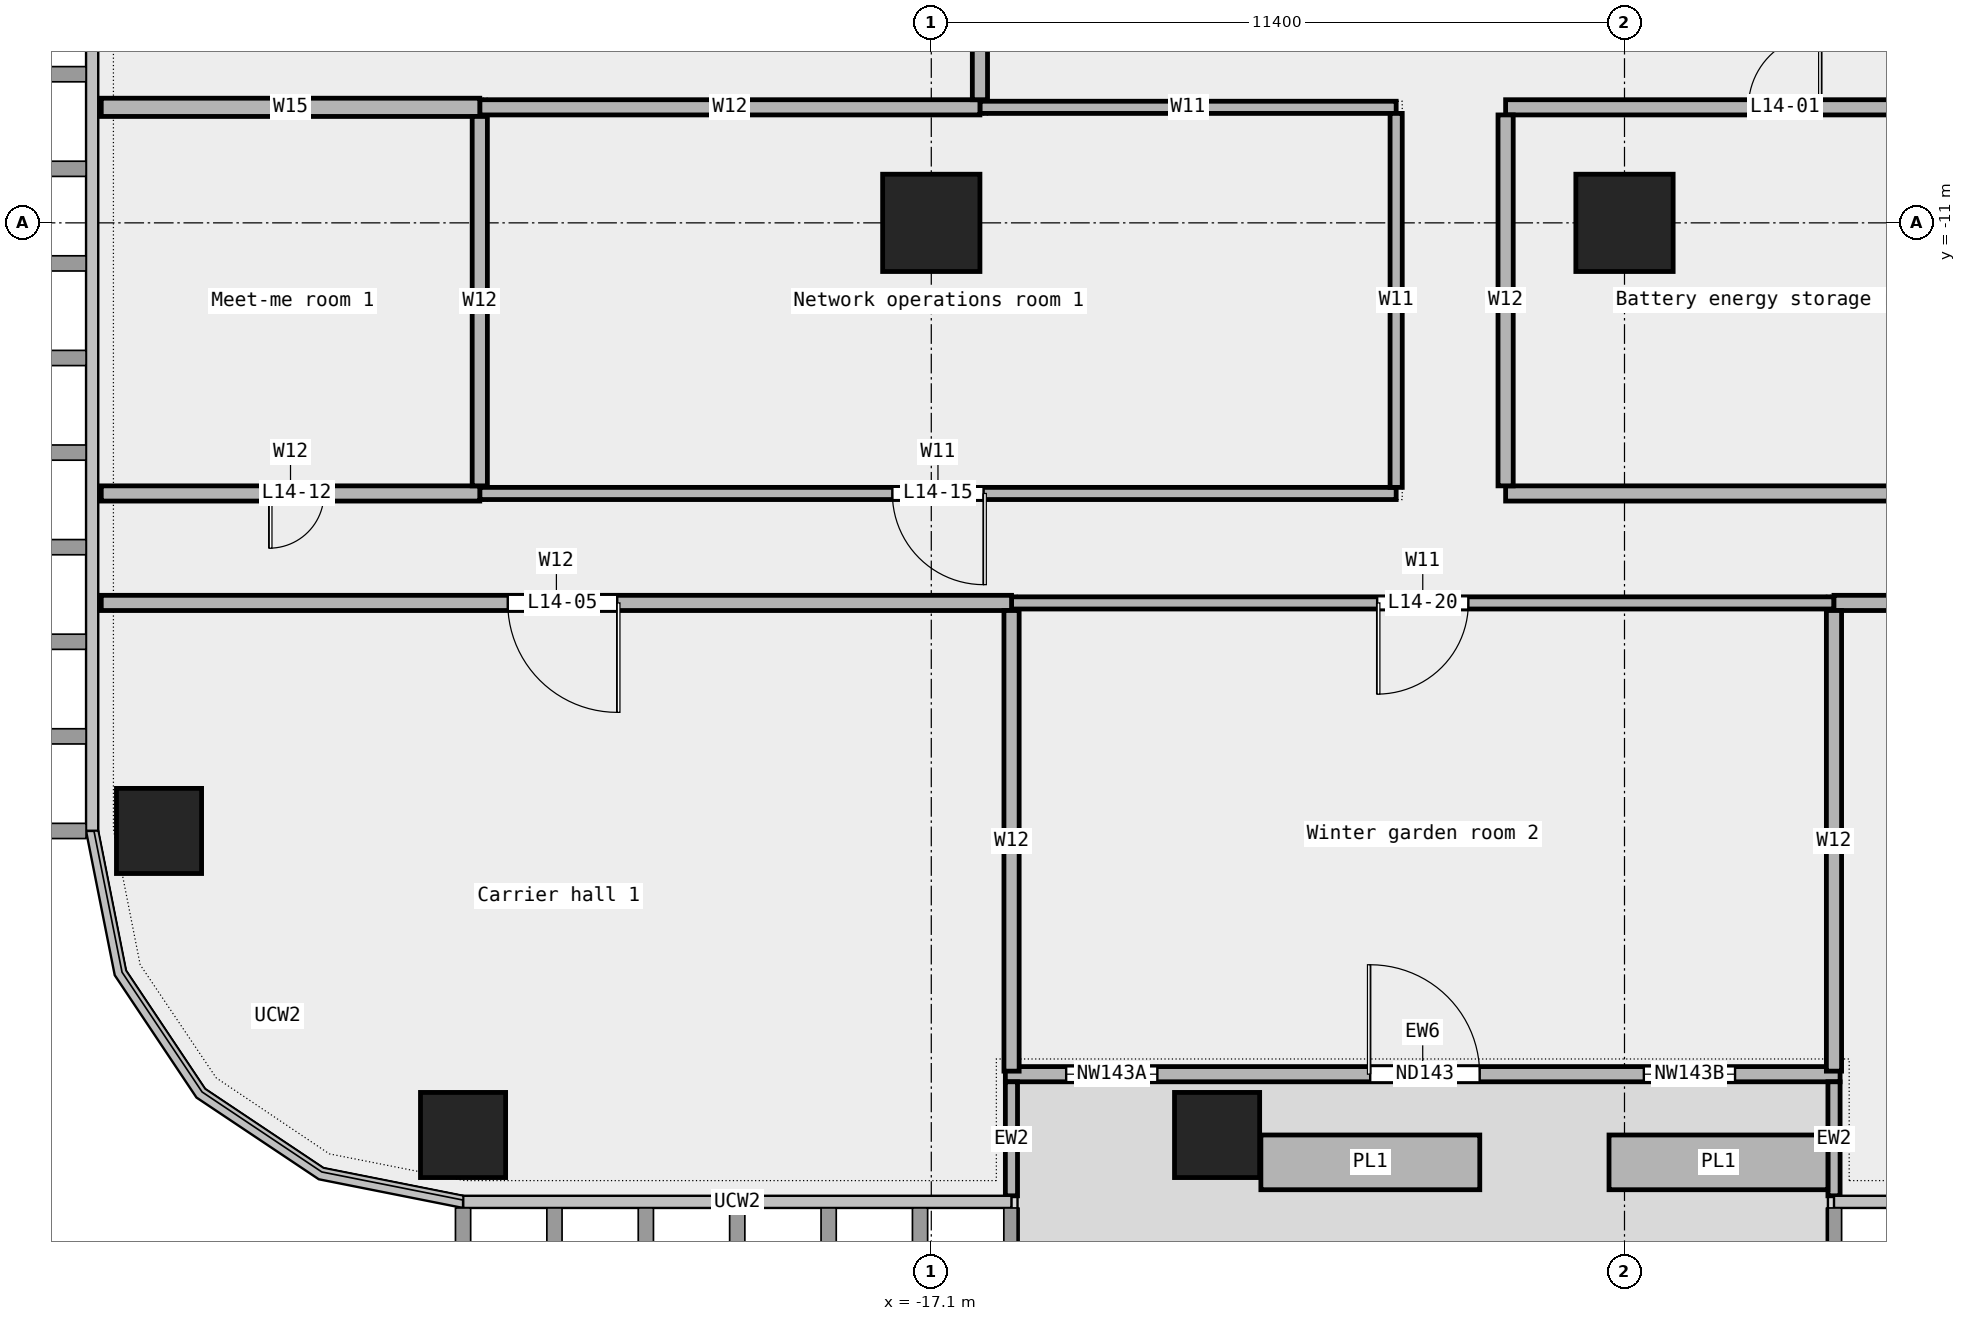
"""IFC4 building model, lengths in metres.
Left out: names, types, materials, properties, quantities, classifications, styles, units other than length and angle.
Written with IfcOpenShell. Run it as: python <this file> out.ifc"""

import sys

from ifc_helpers import new_model, si_unit, direction, frame, frame_2d, origin, origin_2d, place, context, subcontext, project, spatial, rectangle, extrude, element, fill, save


model = new_model("IFC4")
c1 = context("Model", 3, precision=1e-05, world=origin(), true_north=direction((0.0, 1.0)))
c2 = subcontext(c1, "Body", "Model", "MODEL_VIEW")
j1 = project(units=[si_unit("LENGTHUNIT", "METRE"), si_unit("PLANEANGLEUNIT", "RADIAN")], contexts=[c1])
p1 = place(None, origin())
s1 = spatial("IfcSite", under=j1, at=p1, CompositionType="ELEMENT")
p2 = place(p1, origin())
s2 = spatial("IfcBuilding", under=s1, at=p2, CompositionType="ELEMENT")
p3 = place(p2, frame((0.0, 0.0, 74.2)))
s3 = spatial("IfcBuildingStorey", under=s2, at=p3, CompositionType="ELEMENT", Elevation=74.2)
for number, where, z_axis, x_axis in (
    (1, (-24.8, -26.0, 0.0), (0.0, 0.0, 1.0), (1.0, 0.0, 0.0)),
    (2, (-12.4, -26.0, 0.0), (0.0, 0.0, 1.0), (1.0, 0.0, 0.0)),
    (3, (-29.8, -21.0, 0.0), (0.0, 0.0, 1.0), (1.0, 0.0, 0.0)),
):
    element("IfcColumn", number, at=place(p3, frame(where, z_axis=z_axis, x_axis=x_axis)), inside=s3, PredefinedType="COLUMN", context=c2, shape_type="SweptSolid", body=[
        extrude(rectangle(XDim=1.4, YDim=1.4, at=origin_2d()), origin(), (0.0, 0.0, 1.0), 4.35),
    ])
for number, where, z_axis, x_axis in (
    (4, (-17.1, -11.0, 0.0), (0.0, 0.0, 1.0), (1.0, 0.0, 0.0)),
    (5, (-5.7, -11.0, 0.0), (0.0, 0.0, 1.0), (1.0, 0.0, 0.0)),
):
    element("IfcColumn", number, at=place(p3, frame(where, z_axis=z_axis, x_axis=x_axis)), inside=s3, PredefinedType="COLUMN", context=c2, shape_type="SweptSolid", body=[
        extrude(rectangle(XDim=1.6, YDim=1.6, at=origin_2d()), origin(), (0.0, 0.0, 1.0), 4.35),
    ])
p4 = place(p3, frame((-15.882, -25.0, 0.0), z_axis=(0.0, 0.0, 1.0), x_axis=(1.0, 0.0, 0.0)))
e6 = element("IfcWall", 6, at=p4, inside=s3, PredefinedType="STANDARD", context=c2, shape_type="SweptSolid", body=[
    extrude(rectangle(XDim=13.727, YDim=0.25, at=frame_2d((6.864, 0.0))), origin(), (0.0, 0.0, 1.0), 4.35),
])
p5 = place(p4, frame((1.0, 0.0, 0.45)))
e7 = element("IfcOpeningElement", 7, at=p5, cuts=e6, PredefinedType="OPENING", context=c2, shape_type="SweptSolid", body=[
    extrude(rectangle(XDim=1.5, YDim=3.0, at=frame_2d((0.75, 1.5))), frame((0.0, 0.137, 0.0), z_axis=(0.0, -1.0, 0.0), x_axis=(1.0, 0.0, 0.0)), (0.0, 0.0, 1.0), 0.274),
])
p6 = place(p4, frame((6.0, 0.0, 0.0)))
e8 = element("IfcOpeningElement", 8, at=p6, cuts=e6, PredefinedType="OPENING", context=c2, shape_type="SweptSolid", body=[
    extrude(rectangle(XDim=1.8, YDim=2.4, at=frame_2d((0.9, 1.2))), frame((0.0, 0.137, 0.0), z_axis=(0.0, -1.0, 0.0), x_axis=(1.0, 0.0, 0.0)), (0.0, 0.0, 1.0), 0.274),
])
p7 = place(p4, frame((10.5, 0.0, 0.45)))
e9 = element("IfcOpeningElement", 9, at=p7, cuts=e6, PredefinedType="OPENING", context=c2, shape_type="SweptSolid", body=[
    extrude(rectangle(XDim=1.5, YDim=3.0, at=frame_2d((0.75, 1.5))), frame((0.0, 0.137, 0.0), z_axis=(0.0, -1.0, 0.0), x_axis=(1.0, 0.0, 0.0)), (0.0, 0.0, 1.0), 0.274),
])
for number, where, z_axis, x_axis in (
    (10, (-15.782, -27.0, 0.0), (0.0, 0.0, 1.0), (0.0, 1.0, 0.0)),
    (11, (-2.255, -27.0, 0.0), (0.0, 0.0, 1.0), (0.0, 1.0, 0.0)),
):
    element("IfcWall", number, at=place(p3, frame(where, z_axis=z_axis, x_axis=x_axis)), inside=s3, PredefinedType="STANDARD", context=c2, shape_type="SweptSolid", body=[
        extrude(rectangle(XDim=1.875, YDim=0.2, at=frame_2d((0.938, 0.0))), origin(), (0.0, 0.0, 1.0), 4.35),
    ])
for number, where, z_axis, x_axis in (
    (12, (-11.68, -26.45, 0.0), (0.0, 0.0, 1.0), (1.0, 0.0, 0.0)),
    (13, (-5.955, -26.45, 0.0), (0.0, 0.0, 1.0), (1.0, 0.0, 0.0)),
):
    element("IfcWall", number, at=place(p3, frame(where, z_axis=z_axis, x_axis=x_axis)), inside=s3, PredefinedType="STANDARD", context=c2, shape_type="SweptSolid", body=[
        extrude(rectangle(XDim=3.6, YDim=0.9, at=frame_2d((1.8, 0.0))), origin(), (0.0, 0.0, 1.0), 0.7),
    ])
p8 = place(p3, frame((-15.78, -17.25, 0.0), z_axis=(0.0, 0.0, 1.0), x_axis=(1.0, 0.0, 0.0)))
e14 = element("IfcWall", 14, at=p8, inside=s3, PredefinedType="PARTITIONING", context=c2, shape_type="SweptSolid", body=[
    extrude(rectangle(XDim=13.525, YDim=0.2, at=frame_2d((6.763, 0.0))), origin(), (0.0, 0.0, 1.0), 4.35),
])
p9 = place(p8, frame((6.012, 0.0, 0.0)))
e15 = element("IfcOpeningElement", 15, at=p9, cuts=e14, PredefinedType="OPENING", context=c2, shape_type="SweptSolid", body=[
    extrude(rectangle(XDim=1.5, YDim=2.1, at=frame_2d((0.75, 1.05))), frame((0.0, 0.112, 0.0), z_axis=(0.0, -1.0, 0.0), x_axis=(1.0, 0.0, 0.0)), (0.0, 0.0, 1.0), 0.224),
])
p10 = place(p3, frame((-30.75, -17.25, 0.0), z_axis=(0.0, 0.0, 1.0), x_axis=(1.0, 0.0, 0.0)))
e16 = element("IfcWall", 16, at=p10, inside=s3, PredefinedType="PARTITIONING", context=c2, shape_type="SweptSolid", body=[
    extrude(rectangle(XDim=14.97, YDim=0.25, at=frame_2d((7.485, 0.0))), origin(), (0.0, 0.0, 1.0), 4.35),
])
p11 = place(p10, frame((6.685, 0.0, 0.0)))
e17 = element("IfcOpeningElement", 17, at=p11, cuts=e16, PredefinedType="OPENING", context=c2, shape_type="SweptSolid", body=[
    extrude(rectangle(XDim=1.8, YDim=2.1, at=frame_2d((0.9, 1.05))), frame((0.0, 0.137, 0.0), z_axis=(0.0, -1.0, 0.0), x_axis=(1.0, 0.0, 0.0)), (0.0, 0.0, 1.0), 0.274),
])
p12 = place(p3, frame((-2.255, -17.25, 0.0), z_axis=(0.0, 0.0, 1.0), x_axis=(1.0, 0.0, 0.0)))
e18 = element("IfcWall", 18, at=p12, inside=s3, PredefinedType="PARTITIONING", context=c2, shape_type="SweptSolid", body=[
    extrude(rectangle(XDim=33.005, YDim=0.25, at=frame_2d((16.502, 0.0))), origin(), (0.0, 0.0, 1.0), 4.35),
])
p13 = place(p12, frame((7.025, 0.0, 0.0)))
e19 = element("IfcOpeningElement", 19, at=p13, cuts=e18, PredefinedType="OPENING", context=c2, shape_type="SweptSolid", body=[
    extrude(rectangle(XDim=1.8, YDim=2.1, at=frame_2d((0.9, 1.05))), frame((0.0, 0.137, 0.0), z_axis=(0.0, -1.0, 0.0), x_axis=(1.0, 0.0, 0.0)), (0.0, 0.0, 1.0), 0.274),
])
p14 = place(p12, frame((23.427, 0.0, 0.0)))
e20 = element("IfcOpeningElement", 20, at=p14, cuts=e18, PredefinedType="OPENING", context=c2, shape_type="SweptSolid", body=[
    extrude(rectangle(XDim=1.8, YDim=2.1, at=frame_2d((0.9, 1.05))), frame((0.0, 0.137, 0.0), z_axis=(0.0, -1.0, 0.0), x_axis=(1.0, 0.0, 0.0)), (0.0, 0.0, 1.0), 0.274),
])
p15 = place(p3, frame((-24.525, -15.45, 0.0), z_axis=(0.0, 0.0, 1.0), x_axis=(1.0, 0.0, 0.0)))
e21 = element("IfcWall", 21, at=p15, inside=s3, PredefinedType="PARTITIONING", context=c2, shape_type="SweptSolid", body=[
    extrude(rectangle(XDim=15.07, YDim=0.2, at=frame_2d((7.535, 0.0))), origin(), (0.0, 0.0, 1.0), 4.35),
])
p16 = place(p15, frame((6.785, 0.0, 0.0)))
e22 = element("IfcOpeningElement", 22, at=p16, cuts=e21, PredefinedType="OPENING", context=c2, shape_type="SweptSolid", body=[
    extrude(rectangle(XDim=1.5, YDim=2.1, at=frame_2d((0.75, 1.05))), frame((0.0, 0.112, 0.0), z_axis=(0.0, -1.0, 0.0), x_axis=(1.0, 0.0, 0.0)), (0.0, 0.0, 1.0), 0.224),
])
p17 = place(p3, frame((-30.75, -15.45, 0.0), z_axis=(0.0, 0.0, 1.0), x_axis=(1.0, 0.0, 0.0)))
e23 = element("IfcWall", 23, at=p17, inside=s3, PredefinedType="PARTITIONING", context=c2, shape_type="SweptSolid", body=[
    extrude(rectangle(XDim=6.225, YDim=0.25, at=frame_2d((3.113, 0.0))), origin(), (0.0, 0.0, 1.0), 4.35),
])
p18 = place(p17, frame((2.762, 0.0, 0.0)))
e24 = element("IfcOpeningElement", 24, at=p18, cuts=e23, PredefinedType="OPENING", context=c2, shape_type="SweptSolid", body=[
    extrude(rectangle(XDim=0.9, YDim=2.1, at=frame_2d((0.45, 1.05))), frame((0.0, 0.137, 0.0), z_axis=(0.0, -1.0, 0.0), x_axis=(1.0, 0.0, 0.0)), (0.0, 0.0, 1.0), 0.274),
])
p19 = place(p3, frame((-7.655, -15.45, 0.0), z_axis=(0.0, 0.0, 1.0), x_axis=(1.0, 0.0, 0.0)))
e25 = element("IfcWall", 25, at=p19, inside=s3, PredefinedType="PARTITIONING", context=c2, shape_type="SweptSolid", body=[
    extrude(rectangle(XDim=18.365, YDim=0.25, at=frame_2d((9.183, 0.0))), origin(), (0.0, 0.0, 1.0), 4.35),
])
p20 = place(p3, frame((-16.3, -9.1, 0.0), z_axis=(0.0, 0.0, 1.0), x_axis=(1.0, 0.0, 0.0)))
e26 = element("IfcWall", 26, at=p20, inside=s3, PredefinedType="PARTITIONING", context=c2, shape_type="SweptSolid", body=[
    extrude(rectangle(XDim=6.845, YDim=0.2, at=frame_2d((3.422, 0.0))), origin(), (0.0, 0.0, 1.0), 4.35),
])
p21 = place(p3, frame((-24.525, -9.1, 0.0), z_axis=(0.0, 0.0, 1.0), x_axis=(1.0, 0.0, 0.0)))
e27 = element("IfcWall", 27, at=p21, inside=s3, PredefinedType="PARTITIONING", context=c2, shape_type="SweptSolid", body=[
    extrude(rectangle(XDim=8.225, YDim=0.25, at=frame_2d((4.112, 0.0))), origin(), (0.0, 0.0, 1.0), 4.35),
])
p22 = place(p3, frame((-7.655, -9.1, 0.0), z_axis=(0.0, 0.0, 1.0), x_axis=(1.0, 0.0, 0.0)))
e28 = element("IfcWall", 28, at=p22, inside=s3, PredefinedType="PARTITIONING", context=c2, shape_type="SweptSolid", body=[
    extrude(rectangle(XDim=18.365, YDim=0.25, at=frame_2d((9.183, 0.0))), origin(), (0.0, 0.0, 1.0), 4.35),
])
p23 = place(p22, frame((3.992, 0.0, 0.0)))
e29 = element("IfcOpeningElement", 29, at=p23, cuts=e28, PredefinedType="OPENING", context=c2, shape_type="SweptSolid", body=[
    extrude(rectangle(XDim=1.2, YDim=2.1, at=frame_2d((0.6, 1.05))), frame((0.0, 0.137, 0.0), z_axis=(0.0, -1.0, 0.0), x_axis=(1.0, 0.0, 0.0)), (0.0, 0.0, 1.0), 0.274),
])
p24 = place(p22, frame((14.375, 0.0, 0.0)))
e30 = element("IfcOpeningElement", 30, at=p24, cuts=e28, PredefinedType="OPENING", context=c2, shape_type="SweptSolid", body=[
    extrude(rectangle(XDim=1.2, YDim=2.1, at=frame_2d((0.6, 1.05))), frame((0.0, 0.137, 0.0), z_axis=(0.0, -1.0, 0.0), x_axis=(1.0, 0.0, 0.0)), (0.0, 0.0, 1.0), 0.274),
])
p25 = place(p3, frame((-30.75, -9.1, 0.0), z_axis=(0.0, 0.0, 1.0), x_axis=(1.0, 0.0, 0.0)))
e31 = element("IfcWall", 31, at=p25, inside=s3, PredefinedType="PARTITIONING", context=c2, shape_type="SweptSolid", body=[
    extrude(rectangle(XDim=6.225, YDim=0.3, at=frame_2d((3.113, 0.0))), origin(), (0.0, 0.0, 1.0), 4.35),
])
p26 = place(p3, frame((-24.525, -15.325, 0.0), z_axis=(0.0, 0.0, 1.0), x_axis=(0.0, 1.0, 0.0)))
e32 = element("IfcWall", 32, at=p26, inside=s3, PredefinedType="PARTITIONING", context=c2, shape_type="SweptSolid", body=[
    extrude(rectangle(XDim=6.075, YDim=0.25, at=frame_2d((3.038, 0.0))), origin(), (0.0, 0.0, 1.0), 4.35),
])
p27 = place(p3, frame((-16.3, -8.975, 0.0), z_axis=(0.0, 0.0, 1.0), x_axis=(0.0, 1.0, 0.0)))
e33 = element("IfcWall", 33, at=p27, inside=s3, PredefinedType="PARTITIONING", context=c2, shape_type="SweptSolid", body=[
    extrude(rectangle(XDim=8.175, YDim=0.25, at=frame_2d((4.087, 0.0))), origin(), (0.0, 0.0, 1.0), 4.35),
])
p28 = place(p27, frame((3.188, 0.0, 0.0)))
e34 = element("IfcOpeningElement", 34, at=p28, cuts=e33, PredefinedType="OPENING", context=c2, shape_type="SweptSolid", body=[
    extrude(rectangle(XDim=1.8, YDim=2.1, at=frame_2d((0.9, 1.05))), frame((0.0, 0.137, 0.0), z_axis=(0.0, -1.0, 0.0), x_axis=(1.0, 0.0, 0.0)), (0.0, 0.0, 1.0), 0.274),
])
p29 = place(p3, frame((-15.78, -24.95, 0.0), z_axis=(0.0, 0.0, 1.0), x_axis=(0.0, 1.0, 0.0)))
e35 = element("IfcWall", 35, at=p29, inside=s3, PredefinedType="PARTITIONING", context=c2, shape_type="SweptSolid", body=[
    extrude(rectangle(XDim=7.575, YDim=0.25, at=frame_2d((3.788, 0.0))), origin(), (0.0, 0.0, 1.0), 4.35),
])
p30 = place(p3, frame((-9.455, -15.35, 0.0), z_axis=(0.0, 0.0, 1.0), x_axis=(0.0, 1.0, 0.0)))
e36 = element("IfcWall", 36, at=p30, inside=s3, PredefinedType="PARTITIONING", context=c2, shape_type="SweptSolid", body=[
    extrude(rectangle(XDim=6.15, YDim=0.2, at=frame_2d((3.075, 0.0))), origin(), (0.0, 0.0, 1.0), 4.35),
])
p31 = place(p3, frame((-7.655, -15.325, 0.0), z_axis=(0.0, 0.0, 1.0), x_axis=(0.0, 1.0, 0.0)))
e37 = element("IfcWall", 37, at=p31, inside=s3, PredefinedType="PARTITIONING", context=c2, shape_type="SweptSolid", body=[
    extrude(rectangle(XDim=6.1, YDim=0.25, at=frame_2d((3.05, 0.0))), origin(), (0.0, 0.0, 1.0), 4.35),
])
p32 = place(p3, frame((-2.255, -24.95, 0.0), z_axis=(0.0, 0.0, 1.0), x_axis=(0.0, 1.0, 0.0)))
e38 = element("IfcWall", 38, at=p32, inside=s3, PredefinedType="PARTITIONING", context=c2, shape_type="SweptSolid", body=[
    extrude(rectangle(XDim=7.575, YDim=0.25, at=frame_2d((3.788, 0.0))), origin(), (0.0, 0.0, 1.0), 4.35),
])
p33 = place(p5, origin())
e39 = element("IfcWindow", 39, at=p33, inside=s3, PartitioningType="SINGLE_PANEL", PredefinedType="WINDOW", context=c2, shape_type="SweptSolid", body=[
    extrude(rectangle(XDim=1.5, YDim=3.0, at=frame_2d((0.75, 1.5))), frame((0.0, 0.03, 0.0), z_axis=(0.0, -1.0, 0.0), x_axis=(1.0, 0.0, 0.0)), (0.0, 0.0, 1.0), 0.06),
])
fill(e7, e39)
p34 = place(p6, origin())
e40 = element("IfcDoor", 40, at=p34, inside=s3, OperationType="DOUBLE_DOOR_SINGLE_SWING", PredefinedType="DOOR", context=c2, shape_type="SweptSolid", body=[
    extrude(rectangle(XDim=1.8, YDim=2.4, at=frame_2d((0.9, 1.2))), frame((0.0, 0.025, 0.0), z_axis=(0.0, -1.0, 0.0), x_axis=(1.0, 0.0, 0.0)), (0.0, 0.0, 1.0), 0.05),
])
fill(e8, e40)
p35 = place(p7, origin())
e41 = element("IfcWindow", 41, at=p35, inside=s3, PartitioningType="SINGLE_PANEL", PredefinedType="WINDOW", context=c2, shape_type="SweptSolid", body=[
    extrude(rectangle(XDim=1.5, YDim=3.0, at=frame_2d((0.75, 1.5))), frame((0.0, 0.03, 0.0), z_axis=(0.0, -1.0, 0.0), x_axis=(1.0, 0.0, 0.0)), (0.0, 0.0, 1.0), 0.06),
])
fill(e9, e41)
p36 = place(p23, origin())
e42 = element("IfcDoor", 42, at=p36, inside=s3, OperationType="SINGLE_SWING_RIGHT", PredefinedType="DOOR", context=c2, shape_type="SweptSolid", body=[
    extrude(rectangle(XDim=1.2, YDim=2.1, at=frame_2d((0.6, 1.05))), frame((0.0, 0.025, 0.0), z_axis=(0.0, -1.0, 0.0), x_axis=(1.0, 0.0, 0.0)), (0.0, 0.0, 1.0), 0.05),
])
fill(e29, e42)
p37 = place(p11, origin())
e43 = element("IfcDoor", 43, at=p37, inside=s3, OperationType="DOUBLE_DOOR_SINGLE_SWING", PredefinedType="DOOR", context=c2, shape_type="SweptSolid", body=[
    extrude(rectangle(XDim=1.8, YDim=2.1, at=frame_2d((0.9, 1.05))), frame((0.0, 0.025, 0.0), z_axis=(0.0, -1.0, 0.0), x_axis=(1.0, 0.0, 0.0)), (0.0, 0.0, 1.0), 0.05),
])
fill(e17, e43)
p38 = place(p18, origin())
e44 = element("IfcDoor", 44, at=p38, inside=s3, OperationType="SINGLE_SWING_RIGHT", PredefinedType="DOOR", context=c2, shape_type="SweptSolid", body=[
    extrude(rectangle(XDim=0.9, YDim=2.1, at=frame_2d((0.45, 1.05))), frame((0.0, 0.025, 0.0), z_axis=(0.0, -1.0, 0.0), x_axis=(1.0, 0.0, 0.0)), (0.0, 0.0, 1.0), 0.05),
])
fill(e24, e44)
p39 = place(p16, origin())
e45 = element("IfcDoor", 45, at=p39, inside=s3, OperationType="DOUBLE_DOOR_SINGLE_SWING", PredefinedType="DOOR", context=c2, shape_type="SweptSolid", body=[
    extrude(rectangle(XDim=1.5, YDim=2.1, at=frame_2d((0.75, 1.05))), frame((0.0, 0.025, 0.0), z_axis=(0.0, -1.0, 0.0), x_axis=(1.0, 0.0, 0.0)), (0.0, 0.0, 1.0), 0.05),
])
fill(e22, e45)
p40 = place(p9, origin())
e46 = element("IfcDoor", 46, at=p40, inside=s3, OperationType="DOUBLE_DOOR_SINGLE_SWING", PredefinedType="DOOR", context=c2, shape_type="SweptSolid", body=[
    extrude(rectangle(XDim=1.5, YDim=2.1, at=frame_2d((0.75, 1.05))), frame((0.0, 0.025, 0.0), z_axis=(0.0, -1.0, 0.0), x_axis=(1.0, 0.0, 0.0)), (0.0, 0.0, 1.0), 0.05),
])
fill(e15, e46)
save(model, sys.argv[1])
